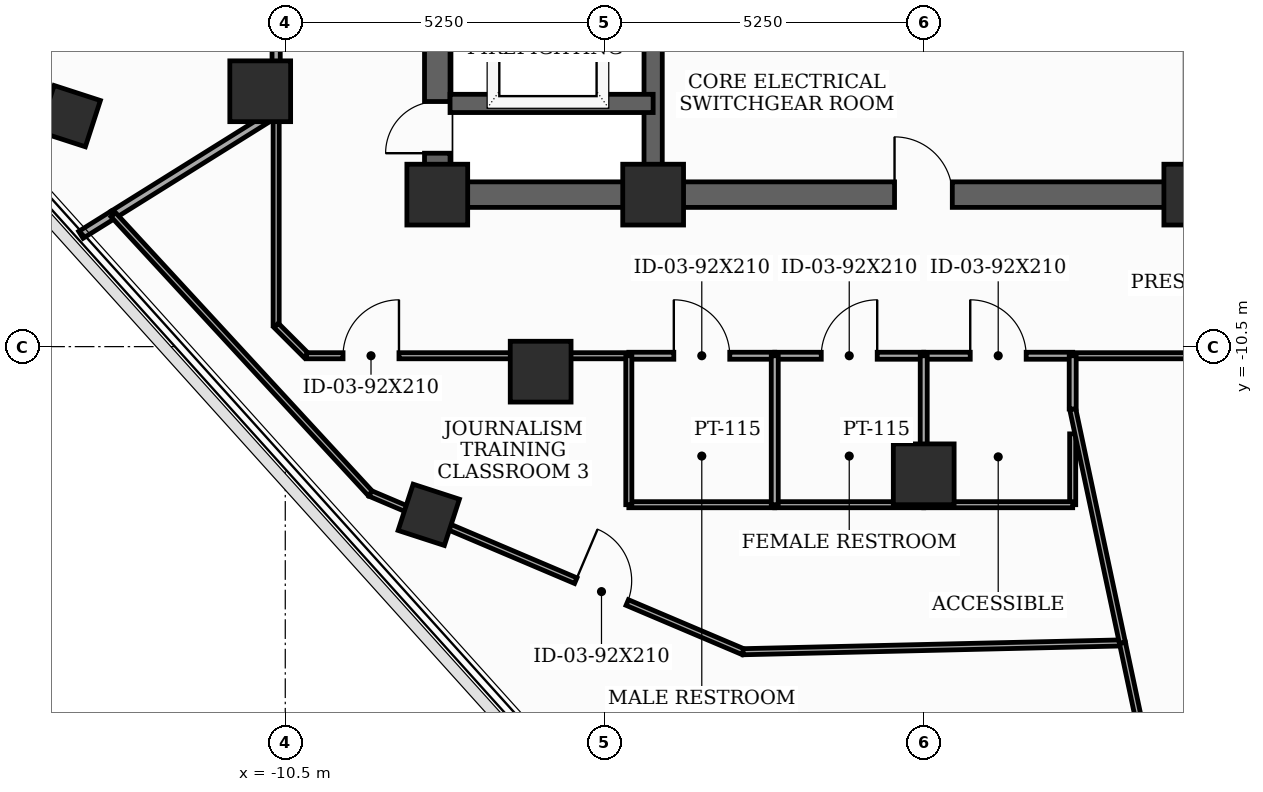
"""IFC4 building model, lengths in metres.
Left out: names, types, materials, properties, quantities, classifications, styles, units other than length and angle.
Written with IfcOpenShell. Run it as: python <this file> out.ifc"""

import sys

from ifc_helpers import new_model, si_unit, direction, frame, frame_2d, origin, origin_2d, place, context, subcontext, project, spatial, rectangle, extrude, element, fill, save


model = new_model("IFC4")
c1 = context("Model", 3, precision=1e-05, world=origin(), true_north=direction((0.0, 1.0)))
c2 = subcontext(c1, "Body", "Model", "MODEL_VIEW")
j1 = project(units=[si_unit("LENGTHUNIT", "METRE"), si_unit("PLANEANGLEUNIT", "RADIAN")], contexts=[c1])
p1 = place(None, origin())
s1 = spatial("IfcSite", under=j1, at=p1, CompositionType="ELEMENT")
p2 = place(p1, origin())
s2 = spatial("IfcBuilding", under=s1, at=p2, CompositionType="ELEMENT")
p3 = place(p2, frame((0.0, 0.0, 286.9)))
s3 = spatial("IfcBuildingStorey", under=s2, at=p3, CompositionType="ELEMENT", Elevation=286.9)
for number, where, z_axis, x_axis in (
    (1, (-8.0, -8.0, 0.0), (0.0, 0.0, 1.0), (1.0, 0.0, 0.0)),
    (2, (-4.45, -8.0, 0.0), (0.0, 0.0, 1.0), (1.0, 0.0, 0.0)),
    (3, (4.45, -8.0, 0.0), (0.0, 0.0, 1.0), (1.0, 0.0, 0.0)),
    (4, (-10.912, -6.3, 0.0), (0.0, 0.0, 1.0), (1.0, 0.0, 0.0)),
    (5, (-6.3, -10.912, 0.0), (0.0, 0.0, 1.0), (1.0, 0.0, 0.0)),
    (6, (0.0, -12.6, 0.0), (0.0, 0.0, 1.0), (1.0, 0.0, 0.0)),
):
    element("IfcColumn", number, at=place(p3, frame(where, z_axis=z_axis, x_axis=x_axis)), inside=s3, PredefinedType="COLUMN", context=c2, shape_type="SweptSolid", body=[
        extrude(rectangle(XDim=1.0, YDim=1.0, at=origin_2d()), origin(), (0.0, 0.0, 1.0), 3.7),
    ])
for number, where, z_axis, x_axis in (
    (7, (-14.045, -6.709, 0.0), (0.0, 0.0, 1.0), (0.309, 0.951, 0.0)),
    (8, (-8.14, -13.266, 0.0), (0.0, 0.0, 1.0), (0.309, 0.951, 0.0)),
):
    element("IfcColumn", number, at=place(p3, frame(where, z_axis=z_axis, x_axis=x_axis)), inside=s3, PredefinedType="COLUMN", context=c2, shape_type="SweptSolid", body=[
        extrude(rectangle(XDim=0.8, YDim=0.8, at=origin_2d()), origin(), (0.0, 0.0, 1.0), 3.7),
    ])
p4 = place(p3, frame((-8.0, -8.0, 0.0), z_axis=(0.0, 0.0, 1.0), x_axis=(0.0, 1.0, 0.0)))
e9 = element("IfcWall", 9, at=p4, inside=s3, PredefinedType="SHEAR", context=c2, shape_type="SweptSolid", body=[
    extrude(rectangle(XDim=16.0, YDim=0.42, at=frame_2d((8.0, 0.0))), origin(), (0.0, 0.0, 1.0), 3.5),
])
p5 = place(p4, frame((0.681, 0.0, 0.0)))
e10 = element("IfcOpeningElement", 10, at=p5, cuts=e9, PredefinedType="OPENING", context=c2, shape_type="SweptSolid", body=[
    extrude(rectangle(XDim=0.85, YDim=2.02, at=frame_2d((0.425, 1.01))), frame((0.0, 0.22, 0.0), z_axis=(0.0, -1.0, 0.0), x_axis=(1.0, 0.0, 0.0)), (0.0, 0.0, 1.0), 0.44),
])
p6 = place(p4, frame((5.35, 0.0, 0.0)))
e11 = element("IfcOpeningElement", 11, at=p6, cuts=e9, PredefinedType="OPENING", context=c2, shape_type="SweptSolid", body=[
    extrude(rectangle(XDim=1.05, YDim=2.15, at=frame_2d((0.525, 1.075))), frame((0.0, 0.22, 0.0), z_axis=(0.0, -1.0, 0.0), x_axis=(1.0, 0.0, 0.0)), (0.0, 0.0, 1.0), 0.44),
])
p7 = place(p3, frame((-8.0, -8.0, 0.0), z_axis=(0.0, 0.0, 1.0), x_axis=(1.0, 0.0, 0.0)))
e12 = element("IfcWall", 12, at=p7, inside=s3, PredefinedType="SHEAR", context=c2, shape_type="SweptSolid", body=[
    extrude(rectangle(XDim=16.0, YDim=0.42, at=frame_2d((8.0, 0.0))), origin(), (0.0, 0.0, 1.0), 3.5),
])
p8 = place(p7, frame((7.52, 0.0, 0.0)))
e13 = element("IfcOpeningElement", 13, at=p8, cuts=e12, PredefinedType="OPENING", context=c2, shape_type="SweptSolid", body=[
    extrude(rectangle(XDim=0.95, YDim=2.1, at=frame_2d((0.475, 1.05))), frame((0.0, 0.22, 0.0), z_axis=(0.0, -1.0, 0.0), x_axis=(1.0, 0.0, 0.0)), (0.0, 0.0, 1.0), 0.44),
])
p9 = place(p3, frame((-4.45, -7.79, 0.0), z_axis=(0.0, 0.0, 1.0), x_axis=(0.0, 1.0, 0.0)))
e14 = element("IfcWall", 14, at=p9, inside=s3, PredefinedType="SHEAR", context=c2, shape_type="SweptSolid", body=[
    extrude(rectangle(XDim=15.58, YDim=0.3, at=frame_2d((7.79, 0.0))), origin(), (0.0, 0.0, 1.0), 3.5),
])
p10 = place(p3, frame((-7.79, -6.5, 0.0), z_axis=(0.0, 0.0, 1.0), x_axis=(1.0, 0.0, 0.0)))
e15 = element("IfcWall", 15, at=p10, inside=s3, PredefinedType="SHEAR", context=c2, shape_type="SweptSolid", body=[
    extrude(rectangle(XDim=3.34, YDim=0.3, at=frame_2d((1.67, 0.0))), origin(), (0.0, 0.0, 1.0), 3.5),
])
p11 = place(p3, frame((-10.65, -4.225, 0.0), z_axis=(0.0, 0.0, 1.0), x_axis=(0.0, -1.0, 0.0)))
e16 = element("IfcWall", 16, at=p11, inside=s3, PredefinedType="PARTITIONING", context=c2, shape_type="SweptSolid", body=[
    extrude(rectangle(XDim=2.43, YDim=0.135, at=frame_2d((1.215, 0.0))), origin(), (0.0, 0.0, 1.0), 2.885),
])
p12 = place(p3, frame((-10.65, -6.655, 0.0), z_axis=(0.0, 0.0, 1.0), x_axis=(0.0, -1.0, 0.0)))
e17 = element("IfcWall", 17, at=p12, inside=s3, PredefinedType="MOVABLE", context=c2, shape_type="SweptSolid", body=[
    extrude(rectangle(XDim=3.495, YDim=0.1, at=frame_2d((1.748, 0.0))), origin(), (0.0, 0.0, 1.0), 2.885),
])
p13 = place(p3, frame((-10.65, -10.15, 0.0), z_axis=(0.0, 0.0, 1.0), x_axis=(0.707106781187, -0.707106781187, 0.0)))
e18 = element("IfcWall", 18, at=p13, inside=s3, PredefinedType="MOVABLE", context=c2, shape_type="SweptSolid", body=[
    extrude(rectangle(XDim=0.707, YDim=0.1, at=frame_2d((0.354, 0.0))), origin(), (0.0, 0.0, 1.0), 3.035),
])
p14 = place(p3, frame((-10.15, -10.65, 0.0), z_axis=(0.0, 0.0, 1.0), x_axis=(1.0, 0.0, 0.0)))
e19 = element("IfcWall", 19, at=p14, inside=s3, PredefinedType="MOVABLE", context=c2, shape_type="SweptSolid", body=[
    extrude(rectangle(XDim=5.3, YDim=0.1, at=frame_2d((2.65, 0.0))), origin(), (0.0, 0.0, 1.0), 2.885),
])
p15 = place(p14, frame((0.6, 0.0, 0.0)))
e20 = element("IfcOpeningElement", 20, at=p15, cuts=e19, PredefinedType="OPENING", context=c2, shape_type="SweptSolid", body=[
    extrude(rectangle(XDim=0.92, YDim=2.1, at=frame_2d((0.46, 1.05))), frame((0.0, 0.06, 0.0), z_axis=(0.0, -1.0, 0.0), x_axis=(1.0, 0.0, 0.0)), (0.0, 0.0, 1.0), 0.12),
])
p16 = place(p3, frame((-4.85, -10.65, 0.0), z_axis=(0.0, 0.0, 1.0), x_axis=(1.0, 0.0, 0.0)))
e21 = element("IfcWall", 21, at=p16, inside=s3, PredefinedType="PARTITIONING", context=c2, shape_type="SweptSolid", body=[
    extrude(rectangle(XDim=2.4, YDim=0.115, at=frame_2d((1.2, 0.0))), origin(), (0.0, 0.0, 1.0), 3.5),
])
p17 = place(p16, frame((0.74, 0.0, 0.0)))
e22 = element("IfcOpeningElement", 22, at=p17, cuts=e21, PredefinedType="OPENING", context=c2, shape_type="SweptSolid", body=[
    extrude(rectangle(XDim=0.92, YDim=2.1, at=frame_2d((0.46, 1.05))), frame((0.0, 0.067, 0.0), z_axis=(0.0, -1.0, 0.0), x_axis=(1.0, 0.0, 0.0)), (0.0, 0.0, 1.0), 0.135),
])
p18 = place(p3, frame((-2.45, -10.65, 0.0), z_axis=(0.0, 0.0, 1.0), x_axis=(1.0, 0.0, 0.0)))
e23 = element("IfcWall", 23, at=p18, inside=s3, PredefinedType="PARTITIONING", context=c2, shape_type="SweptSolid", body=[
    extrude(rectangle(XDim=2.45, YDim=0.115, at=frame_2d((1.225, 0.0))), origin(), (0.0, 0.0, 1.0), 2.885),
])
p19 = place(p18, frame((0.765, 0.0, 0.0)))
e24 = element("IfcOpeningElement", 24, at=p19, cuts=e23, PredefinedType="OPENING", context=c2, shape_type="SweptSolid", body=[
    extrude(rectangle(XDim=0.92, YDim=2.1, at=frame_2d((0.46, 1.05))), frame((0.0, 0.067, 0.0), z_axis=(0.0, -1.0, 0.0), x_axis=(1.0, 0.0, 0.0)), (0.0, 0.0, 1.0), 0.135),
])
p20 = place(p3, frame((0.0, -10.65, 0.0), z_axis=(0.0, 0.0, 1.0), x_axis=(1.0, 0.0, 0.0)))
e25 = element("IfcWall", 25, at=p20, inside=s3, PredefinedType="PARTITIONING", context=c2, shape_type="SweptSolid", body=[
    extrude(rectangle(XDim=2.45, YDim=0.115, at=frame_2d((1.225, 0.0))), origin(), (0.0, 0.0, 1.0), 3.5),
])
p21 = place(p20, frame((0.765, 0.0, 0.0)))
e26 = element("IfcOpeningElement", 26, at=p21, cuts=e25, PredefinedType="OPENING", context=c2, shape_type="SweptSolid", body=[
    extrude(rectangle(XDim=0.92, YDim=2.1, at=frame_2d((0.46, 1.05))), frame((0.0, 0.067, 0.0), z_axis=(0.0, -1.0, 0.0), x_axis=(1.0, 0.0, 0.0)), (0.0, 0.0, 1.0), 0.135),
])
p22 = place(p3, frame((2.45, -10.65, 0.0), z_axis=(0.0, 0.0, 1.0), x_axis=(1.0, 0.0, 0.0)))
e27 = element("IfcWall", 27, at=p22, inside=s3, PredefinedType="MOVABLE", context=c2, shape_type="SweptSolid", body=[
    extrude(rectangle(XDim=7.139, YDim=0.1, at=frame_2d((3.57, 0.0))), origin(), (0.0, 0.0, 1.0), 2.885),
])
p23 = place(p3, frame((-13.329, -8.329, 0.0), z_axis=(0.0, 0.0, 1.0), x_axis=(0.848059079617, 0.529901686617, 0.0)))
e28 = element("IfcWall", 28, at=p23, inside=s3, PredefinedType="PARTITIONING", context=c2, shape_type="SweptSolid", body=[
    extrude(rectangle(XDim=3.159, YDim=0.135, at=frame_2d((1.58, 0.0))), origin(), (0.0, 0.0, 1.0), 2.885),
])
p24 = place(p3, frame((-13.861, -8.661, 0.0), z_axis=(0.0, 0.0, 1.0), x_axis=(0.848151340075, 0.529754003599, 0.0)))
e29 = element("IfcWall", 29, at=p24, inside=s3, PredefinedType="PARTITIONING", context=c2, shape_type="SweptSolid", body=[
    extrude(rectangle(XDim=0.627, YDim=0.135, at=frame_2d((0.313, 0.0))), origin(), (0.0, 0.0, 1.0), 3.5),
])
p25 = place(p3, frame((-2.45, -13.1, 0.0), z_axis=(0.0, 0.0, 1.0), x_axis=(-1.0, 0.0, 0.0)))
e30 = element("IfcWall", 30, at=p25, inside=s3, PredefinedType="MOVABLE", context=c2, shape_type="SweptSolid", body=[
    extrude(rectangle(XDim=2.4, YDim=0.1, at=frame_2d((1.2, 0.0))), origin(), (0.0, 0.0, 1.0), 3.5),
])
p26 = place(p3, frame((-4.85, -13.1, 0.0), z_axis=(0.0, 0.0, 1.0), x_axis=(0.0, 1.0, 0.0)))
e31 = element("IfcWall", 31, at=p26, inside=s3, PredefinedType="MOVABLE", context=c2, shape_type="SweptSolid", body=[
    extrude(rectangle(XDim=2.45, YDim=0.1, at=frame_2d((1.225, 0.0))), origin(), (0.0, 0.0, 1.0), 2.885),
])
p27 = place(p3, frame((0.0, -13.1, 0.0), z_axis=(0.0, 0.0, 1.0), x_axis=(-1.0, 0.0, 0.0)))
e32 = element("IfcWall", 32, at=p27, inside=s3, PredefinedType="MOVABLE", context=c2, shape_type="SweptSolid", body=[
    extrude(rectangle(XDim=2.45, YDim=0.1, at=frame_2d((1.225, 0.0))), origin(), (0.0, 0.0, 1.0), 3.035),
])
p28 = place(p3, frame((-13.329, -8.329, 0.0), z_axis=(0.0, 0.0, 1.0), x_axis=(0.677841155448, -0.735208384052, 0.0)))
e33 = element("IfcWall", 33, at=p28, inside=s3, PredefinedType="MOVABLE", context=c2, shape_type="SweptSolid", body=[
    extrude(rectangle(XDim=6.239, YDim=0.1, at=frame_2d((3.12, 0.0))), origin(), (0.0, 0.0, 1.0), 3.5),
])
p29 = place(p3, frame((-9.1, -12.916, 0.0), z_axis=(0.0, 0.0, 1.0), x_axis=(0.920506675175, -0.390726836752, 0.0)))
e34 = element("IfcWall", 34, at=p29, inside=s3, PredefinedType="MOVABLE", context=c2, shape_type="SweptSolid", body=[
    extrude(rectangle(XDim=6.659, YDim=0.1, at=frame_2d((3.33, 0.0))), origin(), (0.0, 0.0, 1.0), 3.035),
])
p30 = place(p29, frame((3.669, 0.0, 0.0)))
e35 = element("IfcOpeningElement", 35, at=p30, cuts=e34, PredefinedType="OPENING", context=c2, shape_type="SweptSolid", body=[
    extrude(rectangle(XDim=0.92, YDim=2.1, at=frame_2d((0.46, 1.05))), frame((0.0, 0.06, 0.0), z_axis=(0.0, -1.0, 0.0), x_axis=(1.0, 0.0, 0.0)), (0.0, 0.0, 1.0), 0.12),
])
p31 = place(p3, frame((-2.97, -15.518, 0.0), z_axis=(0.0, 0.0, 1.0), x_axis=(0.99972988351, 0.023241342836, 0.0)))
e36 = element("IfcWall", 36, at=p31, inside=s3, PredefinedType="MOVABLE", context=c2, shape_type="SweptSolid", body=[
    extrude(rectangle(XDim=6.24, YDim=0.1, at=frame_2d((3.12, 0.0))), origin(), (0.0, 0.0, 1.0), 3.035),
])
p32 = place(p3, frame((2.45, -11.935, 0.0), z_axis=(0.0, 0.0, 1.0), x_axis=(0.0, -1.0, 0.0)))
e37 = element("IfcWall", 37, at=p32, inside=s3, PredefinedType="MOVABLE", context=c2, shape_type="SweptSolid", body=[
    extrude(rectangle(XDim=1.166, YDim=0.1, at=frame_2d((0.583, 0.0))), origin(), (0.0, 0.0, 1.0), 2.885),
])
p33 = place(p3, frame((2.45, -13.1, 0.0), z_axis=(0.0, 0.0, 1.0), x_axis=(-1.0, 0.0, 0.0)))
e38 = element("IfcWall", 38, at=p33, inside=s3, PredefinedType="MOVABLE", context=c2, shape_type="SweptSolid", body=[
    extrude(rectangle(XDim=2.45, YDim=0.1, at=frame_2d((1.225, 0.0))), origin(), (0.0, 0.0, 1.0), 3.035),
])
p34 = place(p3, frame((3.268, -15.373, 0.0), z_axis=(0.0, 0.0, 1.0), x_axis=(-0.208002774368, 0.978128235895, 0.0)))
e39 = element("IfcWall", 39, at=p34, inside=s3, PredefinedType="MOVABLE", context=c2, shape_type="SweptSolid", body=[
    extrude(rectangle(XDim=3.933, YDim=0.1, at=frame_2d((1.967, 0.0))), origin(), (0.0, 0.0, 1.0), 2.885),
])
for number, where, z_axis, x_axis in (
    (40, (-2.45, -13.1, 0.0), (0.0, 0.0, 1.0), (0.0, 1.0, 0.0)),
    (41, (0.0, -13.1, 0.0), (0.0, 0.0, 1.0), (0.0, 1.0, 0.0)),
):
    element("IfcWall", number, at=place(p3, frame(where, z_axis=z_axis, x_axis=x_axis)), inside=s3, PredefinedType="PARTITIONING", context=c2, shape_type="SweptSolid", body=[
        extrude(rectangle(XDim=2.45, YDim=0.115, at=frame_2d((1.225, 0.0))), origin(), (0.0, 0.0, 1.0), 2.885),
    ])
p35 = place(p3, frame((5.994, -28.2, 0.0), z_axis=(0.0, 0.0, 1.0), x_axis=(-0.20785296635, 0.978160081162, 0.0)))
e42 = element("IfcWall", 42, at=p35, inside=s3, PredefinedType="MOVABLE", context=c2, shape_type="SweptSolid", body=[
    extrude(rectangle(XDim=13.113, YDim=0.1, at=frame_2d((6.557, 0.0))), origin(), (0.0, 0.0, 1.0), 3.035),
])
p36 = place(p3, frame((2.45, -11.526, 0.0), z_axis=(0.0, 0.0, 1.0), x_axis=(0.0, 1.0, 0.0)))
e43 = element("IfcWall", 43, at=p36, inside=s3, PredefinedType="PARTITIONING", context=c2, shape_type="SweptSolid", body=[
    extrude(rectangle(XDim=0.876, YDim=0.115, at=frame_2d((0.438, 0.0))), origin(), (0.0, 0.0, 1.0), 3.5),
])
p37 = place(p5, origin())
e44 = element("IfcDoor", 44, at=p37, inside=s3, OperationType="SINGLE_SWING_LEFT", PredefinedType="TRAPDOOR", context=c2, shape_type="SweptSolid", body=[
    extrude(rectangle(XDim=0.85, YDim=2.02, at=frame_2d((0.425, 1.01))), frame((0.0, 0.025, 0.0), z_axis=(0.0, -1.0, 0.0), x_axis=(1.0, 0.0, 0.0)), (0.0, 0.0, 1.0), 0.05),
])
fill(e10, e44)
p38 = place(p8, origin())
e45 = element("IfcDoor", 45, at=p38, inside=s3, OperationType="SINGLE_SWING_LEFT", PredefinedType="DOOR", context=c2, shape_type="SweptSolid", body=[
    extrude(rectangle(XDim=0.95, YDim=2.1, at=frame_2d((0.475, 1.05))), frame((0.0, 0.025, 0.0), z_axis=(0.0, -1.0, 0.0), x_axis=(1.0, 0.0, 0.0)), (0.0, 0.0, 1.0), 0.05),
])
fill(e13, e45)
p39 = place(p15, origin())
e46 = element("IfcDoor", 46, at=p39, inside=s3, OperationType="SINGLE_SWING_RIGHT", PredefinedType="DOOR", context=c2, shape_type="SweptSolid", body=[
    extrude(rectangle(XDim=0.92, YDim=2.1, at=frame_2d((0.46, 1.05))), frame((0.0, 0.025, 0.0), z_axis=(0.0, -1.0, 0.0), x_axis=(1.0, 0.0, 0.0)), (0.0, 0.0, 1.0), 0.05),
])
fill(e20, e46)
p40 = place(p17, origin())
e47 = element("IfcDoor", 47, at=p40, inside=s3, OperationType="SINGLE_SWING_LEFT", PredefinedType="DOOR", context=c2, shape_type="SweptSolid", body=[
    extrude(rectangle(XDim=0.92, YDim=2.1, at=frame_2d((0.46, 1.05))), frame((0.0, 0.025, 0.0), z_axis=(0.0, -1.0, 0.0), x_axis=(1.0, 0.0, 0.0)), (0.0, 0.0, 1.0), 0.05),
])
fill(e22, e47)
p41 = place(p19, origin())
e48 = element("IfcDoor", 48, at=p41, inside=s3, OperationType="SINGLE_SWING_RIGHT", PredefinedType="DOOR", context=c2, shape_type="SweptSolid", body=[
    extrude(rectangle(XDim=0.92, YDim=2.1, at=frame_2d((0.46, 1.05))), frame((0.0, 0.025, 0.0), z_axis=(0.0, -1.0, 0.0), x_axis=(1.0, 0.0, 0.0)), (0.0, 0.0, 1.0), 0.05),
])
fill(e24, e48)
p42 = place(p21, origin())
e49 = element("IfcDoor", 49, at=p42, inside=s3, OperationType="SINGLE_SWING_LEFT", PredefinedType="DOOR", context=c2, shape_type="SweptSolid", body=[
    extrude(rectangle(XDim=0.92, YDim=2.1, at=frame_2d((0.46, 1.05))), frame((0.0, 0.025, 0.0), z_axis=(0.0, -1.0, 0.0), x_axis=(1.0, 0.0, 0.0)), (0.0, 0.0, 1.0), 0.05),
])
fill(e26, e49)
p43 = place(p30, origin())
e50 = element("IfcDoor", 50, at=p43, inside=s3, OperationType="SINGLE_SWING_LEFT", PredefinedType="DOOR", context=c2, shape_type="SweptSolid", body=[
    extrude(rectangle(XDim=0.92, YDim=2.1, at=frame_2d((0.46, 1.05))), frame((0.0, 0.025, 0.0), z_axis=(0.0, -1.0, 0.0), x_axis=(1.0, 0.0, 0.0)), (0.0, 0.0, 1.0), 0.05),
])
fill(e35, e50)
save(model, sys.argv[1])
